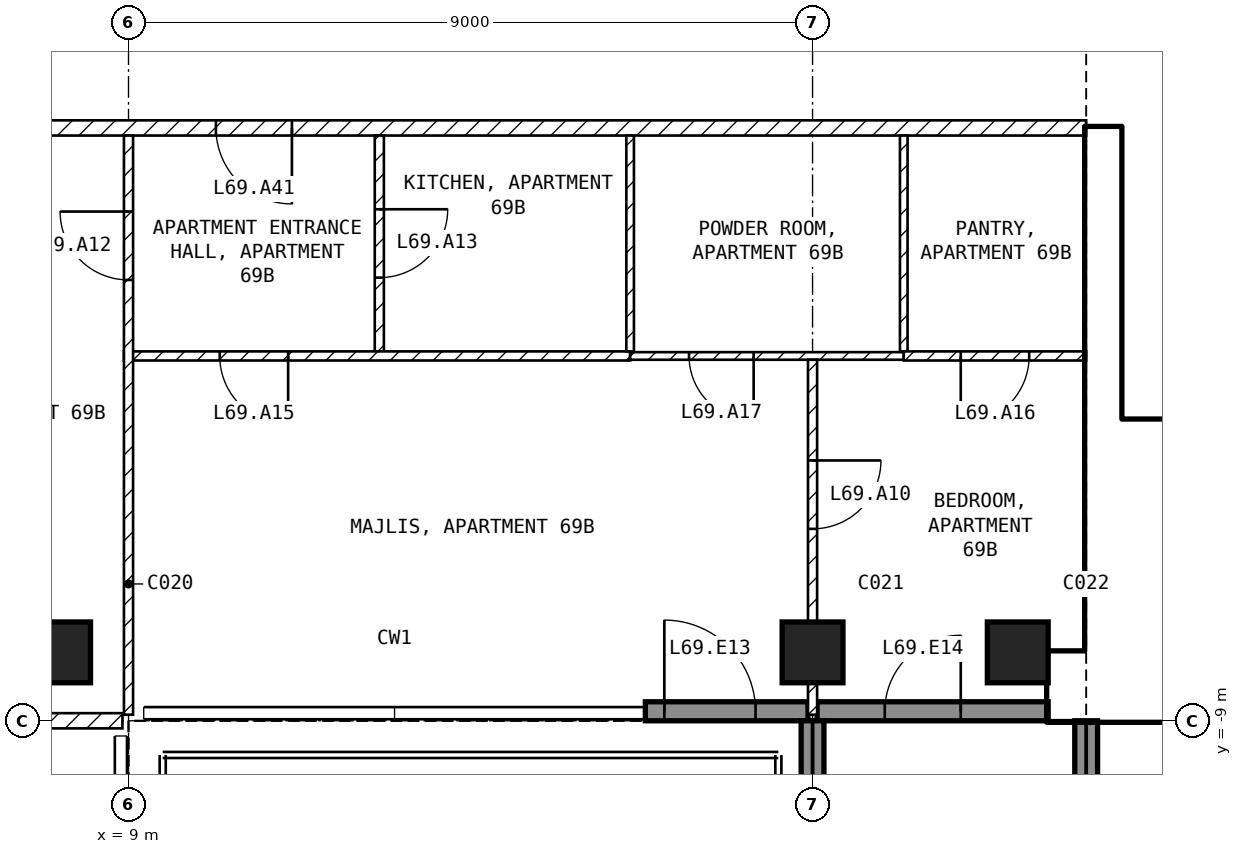
"""IFC4 building model, lengths in metres.
Left out: names, types, materials, properties, quantities, classifications, styles, units other than length and angle.
Written with IfcOpenShell. Run it as: python <this file> out.ifc"""

import sys

from ifc_helpers import new_model, si_unit, direction, frame, frame_2d, origin, origin_2d, place, context, subcontext, project, spatial, rectangle, extrude, element, fill, save


model = new_model("IFC4")
c1 = context("Model", 3, precision=1e-05, world=origin(), true_north=direction((0.0, 1.0)))
c2 = subcontext(c1, "Body", "Model", "MODEL_VIEW")
j1 = project(units=[si_unit("LENGTHUNIT", "METRE"), si_unit("PLANEANGLEUNIT", "RADIAN")], contexts=[c1])
p1 = place(None, origin())
s1 = spatial("IfcSite", under=j1, at=p1, CompositionType="ELEMENT")
p2 = place(p1, origin())
s2 = spatial("IfcBuilding", under=s1, at=p2, CompositionType="ELEMENT")
p3 = place(p2, frame((0.0, 0.0, 271.0)))
s3 = spatial("IfcBuildingStorey", under=s2, at=p3, CompositionType="ELEMENT", Elevation=271.0)
for number, where, z_axis, x_axis in (
    (1, (8.1, -8.1, -0.25), (0.0, 0.0, 1.0), (1.0, 0.0, 0.0)),
    (2, (18.0, -8.1, -0.25), (0.0, 0.0, 1.0), (1.0, 0.0, 0.0)),
    (3, (20.7, -8.1, -0.25), (0.0, 0.0, 1.0), (1.0, 0.0, 0.0)),
):
    element("IfcColumn", number, at=place(p3, frame(where, z_axis=z_axis, x_axis=x_axis)), inside=s3, PredefinedType="COLUMN", context=c2, shape_type="SweptSolid", body=[
        extrude(rectangle(XDim=0.8, YDim=0.8, at=origin_2d()), origin(), (0.0, 0.0, 1.0), 3.5),
    ])
p4 = place(p3, frame((15.8, -8.875, 0.0), z_axis=(0.0, 0.0, 1.0), x_axis=(1.0, 0.0, 0.0)))
e4 = element("IfcWall", 4, at=p4, inside=s3, PredefinedType="SOLIDWALL", context=c2, shape_type="SweptSolid", body=[
    extrude(rectangle(XDim=2.14, YDim=0.25, at=frame_2d((1.07, 0.0))), origin(), (0.0, 0.0, 1.0), 3.25),
])
p5 = place(p4, frame((0.25, 0.0, 0.0)))
e5 = element("IfcOpeningElement", 5, at=p5, cuts=e4, PredefinedType="OPENING", context=c2, shape_type="SweptSolid", body=[
    extrude(rectangle(XDim=1.2, YDim=2.4, at=frame_2d((0.6, 1.2))), frame((0.0, 0.135, 0.0), z_axis=(0.0, -1.0, 0.0), x_axis=(1.0, 0.0, 0.0)), (0.0, 0.0, 1.0), 0.27),
])
p6 = place(p3, frame((18.06, -8.875, 0.0), z_axis=(0.0, 0.0, 1.0), x_axis=(1.0, 0.0, 0.0)))
e6 = element("IfcWall", 6, at=p6, inside=s3, PredefinedType="SOLIDWALL", context=c2, shape_type="SweptSolid", body=[
    extrude(rectangle(XDim=3.04, YDim=0.25, at=frame_2d((1.52, 0.0))), origin(), (0.0, 0.0, 1.0), 3.25),
])
p7 = place(p6, frame((0.89, 0.0, 0.0)))
e7 = element("IfcOpeningElement", 7, at=p7, cuts=e6, PredefinedType="OPENING", context=c2, shape_type="SweptSolid", body=[
    extrude(rectangle(XDim=1.0, YDim=2.4, at=frame_2d((0.5, 1.2))), frame((0.0, 0.135, 0.0), z_axis=(0.0, -1.0, 0.0), x_axis=(1.0, 0.0, 0.0)), (0.0, 0.0, 1.0), 0.27),
])
p8 = place(p3, frame((18.0, -9.0, 0.0), z_axis=(0.0, 0.0, 1.0), x_axis=(0.0, -1.0, 0.0)))
e8 = element("IfcWall", 8, at=p8, inside=s3, PredefinedType="SOLIDWALL", context=c2, shape_type="SweptSolid", body=[
    extrude(rectangle(XDim=2.74, YDim=0.3, at=frame_2d((1.37, 0.0))), origin(), (0.0, 0.0, 1.0), 3.25),
])
p9 = place(p3, frame((21.6, -9.0, 0.0), z_axis=(0.0, 0.0, 1.0), x_axis=(0.0, -1.0, 0.0)))
e9 = element("IfcWall", 9, at=p9, inside=s3, PredefinedType="SOLIDWALL", context=c2, shape_type="SweptSolid", body=[
    extrude(rectangle(XDim=2.7, YDim=0.3, at=frame_2d((1.35, 0.0))), origin(), (0.0, 0.0, 1.0), 3.25),
])
p10 = place(p3, frame((21.1, -8.55, 0.0), z_axis=(0.0, 0.0, 1.0), x_axis=(1.0, 0.0, 0.0)))
e10 = element("IfcWall", 10, at=p10, inside=s3, PredefinedType="SHEAR", context=c2, shape_type="SweptSolid", body=[
    extrude(rectangle(XDim=9.1, YDim=0.9, at=frame_2d((4.55, 0.0))), origin(), (0.0, 0.0, 1.0), 3.25),
])
p11 = place(p3, frame((21.825, -8.1, 0.0), z_axis=(0.0, 0.0, 1.0), x_axis=(0.0, 1.0, 0.0)))
e11 = element("IfcWall", 11, at=p11, inside=s3, PredefinedType="SHEAR", context=c2, shape_type="SweptSolid", body=[
    extrude(rectangle(XDim=6.9, YDim=0.45, at=frame_2d((3.45, 0.0))), origin(), (0.0, 0.0, 1.0), 3.25),
])
p12 = place(p3, frame((22.05, -5.15, 0.0), z_axis=(0.0, 0.0, 1.0), x_axis=(1.0, 0.0, 0.0)))
e12 = element("IfcWall", 12, at=p12, inside=s3, PredefinedType="SOLIDWALL", context=c2, shape_type="SweptSolid", body=[
    extrude(rectangle(XDim=6.3, YDim=0.2, at=frame_2d((3.15, 0.0))), origin(), (0.0, 0.0, 1.0), 3.25),
])
p13 = place(p12, frame((0.2, 0.0, 0.0)))
e13 = element("IfcOpeningElement", 13, at=p13, cuts=e12, PredefinedType="OPENING", context=c2, shape_type="SweptSolid", body=[
    extrude(rectangle(XDim=1.0, YDim=2.1, at=frame_2d((0.5, 1.05))), frame((0.0, 0.11, 0.0), z_axis=(0.0, -1.0, 0.0), x_axis=(1.0, 0.0, 0.0)), (0.0, 0.0, 1.0), 0.22),
])
p14 = place(p3, frame((21.6, -1.2, 0.0), z_axis=(0.0, 0.0, 1.0), x_axis=(-1.0, 0.0, 0.0)))
e14 = element("IfcWall", 14, at=p14, inside=s3, PredefinedType="PARTITIONING", context=c2, shape_type="SweptSolid", body=[
    extrude(rectangle(XDim=17.2, YDim=0.2, at=frame_2d((8.6, 0.0))), origin(), (0.0, 0.0, 1.0), 3.25),
])
p15 = place(p14, frame((10.45, 0.0, 0.0)))
e15 = element("IfcOpeningElement", 15, at=p15, cuts=e14, PredefinedType="OPENING", context=c2, shape_type="SweptSolid", body=[
    extrude(rectangle(XDim=1.0, YDim=2.1, at=frame_2d((0.5, 1.05))), frame((0.0, 0.11, 0.0), z_axis=(0.0, -1.0, 0.0), x_axis=(1.0, 0.0, 0.0)), (0.0, 0.0, 1.0), 0.22),
])
p16 = place(p3, frame((8.92, -9.0, 0.0), z_axis=(0.0, 0.0, 1.0), x_axis=(-1.0, 0.0, 0.0)))
e16 = element("IfcWall", 16, at=p16, inside=s3, PredefinedType="PARTITIONING", context=c2, shape_type="SweptSolid", body=[
    extrude(rectangle(XDim=17.84, YDim=0.2, at=frame_2d((8.92, 0.0))), origin(), (0.0, 0.0, 1.0), 3.25),
])
p17 = place(p16, frame((8.42, 0.0, 0.0)))
e17 = element("IfcOpeningElement", 17, at=p17, cuts=e16, PredefinedType="OPENING", context=c2, shape_type="SweptSolid", body=[
    extrude(rectangle(XDim=1.0, YDim=2.1, at=frame_2d((0.5, 1.05))), frame((0.0, 0.11, 0.0), z_axis=(0.0, -1.0, 0.0), x_axis=(1.0, 0.0, 0.0)), (0.0, 0.0, 1.0), 0.22),
])
p18 = place(p3, frame((12.3, -1.3, 0.0), z_axis=(0.0, 0.0, 1.0), x_axis=(0.0, -1.0, 0.0)))
e18 = element("IfcWall", 18, at=p18, inside=s3, PredefinedType="PARTITIONING", context=c2, shape_type="SweptSolid", body=[
    extrude(rectangle(XDim=2.84, YDim=0.12, at=frame_2d((1.42, 0.0))), origin(), (0.0, 0.0, 1.0), 3.25),
])
p19 = place(p18, frame((0.97, 0.0, 0.0)))
e19 = element("IfcOpeningElement", 19, at=p19, cuts=e18, PredefinedType="OPENING", context=c2, shape_type="SweptSolid", body=[
    extrude(rectangle(XDim=0.9, YDim=2.1, at=frame_2d((0.45, 1.05))), frame((0.0, 0.07, 0.0), z_axis=(0.0, -1.0, 0.0), x_axis=(1.0, 0.0, 0.0)), (0.0, 0.0, 1.0), 0.14),
])
p20 = place(p3, frame((15.6, -4.2, 0.0), z_axis=(0.0, 0.0, 1.0), x_axis=(-1.0, 0.0, 0.0)))
e20 = element("IfcWall", 20, at=p20, inside=s3, PredefinedType="PARTITIONING", context=c2, shape_type="SweptSolid", body=[
    extrude(rectangle(XDim=6.66, YDim=0.12, at=frame_2d((3.33, 0.0))), origin(), (0.0, 0.0, 1.0), 3.25),
])
p21 = place(p20, frame((4.5, 0.0, 0.0)))
e21 = element("IfcOpeningElement", 21, at=p21, cuts=e20, PredefinedType="OPENING", context=c2, shape_type="SweptSolid", body=[
    extrude(rectangle(XDim=0.9, YDim=2.1, at=frame_2d((0.45, 1.05))), frame((0.0, 0.07, 0.0), z_axis=(0.0, -1.0, 0.0), x_axis=(1.0, 0.0, 0.0)), (0.0, 0.0, 1.0), 0.14),
])
p22 = place(p3, frame((9.0, -8.92, 0.0), z_axis=(0.0, 0.0, 1.0), x_axis=(0.0, 1.0, 0.0)))
e22 = element("IfcWall", 22, at=p22, inside=s3, PredefinedType="PARTITIONING", context=c2, shape_type="SweptSolid", body=[
    extrude(rectangle(XDim=7.62, YDim=0.12, at=frame_2d((3.81, 0.0))), origin(), (0.0, 0.0, 1.0), 3.25),
])
p23 = place(p22, frame((5.72, 0.0, 0.0)))
e23 = element("IfcOpeningElement", 23, at=p23, cuts=e22, PredefinedType="OPENING", context=c2, shape_type="SweptSolid", body=[
    extrude(rectangle(XDim=0.9, YDim=2.1, at=frame_2d((0.45, 1.05))), frame((0.0, 0.07, 0.0), z_axis=(0.0, -1.0, 0.0), x_axis=(1.0, 0.0, 0.0)), (0.0, 0.0, 1.0), 0.14),
])
for number, where, z_axis, x_axis in (
    (24, (15.6, -1.3, 0.0), (0.0, 0.0, 1.0), (0.0, -1.0, 0.0)),
    (25, (19.2, -1.3, 0.0), (0.0, 0.0, 1.0), (0.0, -1.0, 0.0)),
):
    element("IfcWall", number, at=place(p3, frame(where, z_axis=z_axis, x_axis=x_axis)), inside=s3, PredefinedType="PARTITIONING", context=c2, shape_type="SweptSolid", body=[
        extrude(rectangle(XDim=2.84, YDim=0.1, at=frame_2d((1.42, 0.0))), origin(), (0.0, 0.0, 1.0), 3.25),
    ])
p24 = place(p3, frame((19.2, -4.2, 0.0), z_axis=(0.0, 0.0, 1.0), x_axis=(-1.0, 0.0, 0.0)))
e26 = element("IfcWall", 26, at=p24, inside=s3, PredefinedType="PARTITIONING", context=c2, shape_type="SweptSolid", body=[
    extrude(rectangle(XDim=3.6, YDim=0.1, at=frame_2d((1.8, 0.0))), origin(), (0.0, 0.0, 1.0), 3.25),
])
p25 = place(p24, frame((1.975, 0.0, 0.0)))
e27 = element("IfcOpeningElement", 27, at=p25, cuts=e26, PredefinedType="OPENING", context=c2, shape_type="SweptSolid", body=[
    extrude(rectangle(XDim=0.85, YDim=2.1, at=frame_2d((0.425, 1.05))), frame((0.0, 0.06, 0.0), z_axis=(0.0, -1.0, 0.0), x_axis=(1.0, 0.0, 0.0)), (0.0, 0.0, 1.0), 0.12),
])
p26 = place(p3, frame((21.6, -4.2, 0.0), z_axis=(0.0, 0.0, 1.0), x_axis=(-1.0, 0.0, 0.0)))
e28 = element("IfcWall", 28, at=p26, inside=s3, PredefinedType="PARTITIONING", context=c2, shape_type="SweptSolid", body=[
    extrude(rectangle(XDim=2.4, YDim=0.12, at=frame_2d((1.2, 0.0))), origin(), (0.0, 0.0, 1.0), 3.25),
])
p27 = place(p26, frame((0.75, 0.0, 0.0)))
e29 = element("IfcOpeningElement", 29, at=p27, cuts=e28, PredefinedType="OPENING", context=c2, shape_type="SweptSolid", body=[
    extrude(rectangle(XDim=0.9, YDim=2.1, at=frame_2d((0.45, 1.05))), frame((0.0, 0.07, 0.0), z_axis=(0.0, -1.0, 0.0), x_axis=(1.0, 0.0, 0.0)), (0.0, 0.0, 1.0), 0.14),
])
p28 = place(p3, frame((18.0, -4.25, 0.0), z_axis=(0.0, 0.0, 1.0), x_axis=(0.0, -1.0, 0.0)))
e30 = element("IfcWall", 30, at=p28, inside=s3, PredefinedType="PARTITIONING", context=c2, shape_type="SweptSolid", body=[
    extrude(rectangle(XDim=4.67, YDim=0.12, at=frame_2d((2.335, 0.0))), origin(), (0.0, 0.0, 1.0), 2.496),
])
p29 = place(p28, frame((1.325, 0.0, 0.0)))
e31 = element("IfcOpeningElement", 31, at=p29, cuts=e30, PredefinedType="OPENING", context=c2, shape_type="SweptSolid", body=[
    extrude(rectangle(XDim=0.9, YDim=2.1, at=frame_2d((0.45, 1.05))), frame((0.0, 0.07, 0.0), z_axis=(0.0, -1.0, 0.0), x_axis=(1.0, 0.0, 0.0)), (0.0, 0.0, 1.0), 0.14),
])
p30 = place(p5, origin())
e32 = element("IfcDoor", 32, at=p30, inside=s3, OperationType="SINGLE_SWING_LEFT", PredefinedType="DOOR", context=c2, shape_type="SweptSolid", body=[
    extrude(rectangle(XDim=1.2, YDim=2.4, at=frame_2d((0.6, 1.2))), frame((0.0, 0.025, 0.0), z_axis=(0.0, -1.0, 0.0), x_axis=(1.0, 0.0, 0.0)), (0.0, 0.0, 1.0), 0.05),
])
fill(e5, e32)
p31 = place(p7, origin())
e33 = element("IfcDoor", 33, at=p31, inside=s3, OperationType="SINGLE_SWING_RIGHT", PredefinedType="DOOR", context=c2, shape_type="SweptSolid", body=[
    extrude(rectangle(XDim=1.0, YDim=2.4, at=frame_2d((0.5, 1.2))), frame((0.0, 0.025, 0.0), z_axis=(0.0, -1.0, 0.0), x_axis=(1.0, 0.0, 0.0)), (0.0, 0.0, 1.0), 0.05),
])
fill(e7, e33)
p32 = place(p13, origin())
e34 = element("IfcDoor", 34, at=p32, inside=s3, OperationType="SINGLE_SWING_LEFT", PredefinedType="DOOR", context=c2, shape_type="SweptSolid", body=[
    extrude(rectangle(XDim=1.0, YDim=2.1, at=frame_2d((0.5, 1.05))), frame((0.0, 0.025, 0.0), z_axis=(0.0, -1.0, 0.0), x_axis=(1.0, 0.0, 0.0)), (0.0, 0.0, 1.0), 0.05),
])
fill(e13, e34)
p33 = place(p29, origin())
e35 = element("IfcDoor", 35, at=p33, inside=s3, OperationType="SINGLE_SWING_LEFT", PredefinedType="DOOR", context=c2, shape_type="SweptSolid", body=[
    extrude(rectangle(XDim=0.9, YDim=2.1, at=frame_2d((0.45, 1.05))), frame((0.0, 0.025, 0.0), z_axis=(0.0, -1.0, 0.0), x_axis=(1.0, 0.0, 0.0)), (0.0, 0.0, 1.0), 0.05),
])
fill(e31, e35)
p34 = place(p23, origin())
e36 = element("IfcDoor", 36, at=p34, inside=s3, OperationType="SINGLE_SWING_RIGHT", PredefinedType="DOOR", context=c2, shape_type="SweptSolid", body=[
    extrude(rectangle(XDim=0.9, YDim=2.1, at=frame_2d((0.45, 1.05))), frame((0.0, 0.025, 0.0), z_axis=(0.0, -1.0, 0.0), x_axis=(1.0, 0.0, 0.0)), (0.0, 0.0, 1.0), 0.05),
])
fill(e23, e36)
p35 = place(p19, origin())
e37 = element("IfcDoor", 37, at=p35, inside=s3, OperationType="SINGLE_SWING_LEFT", PredefinedType="DOOR", context=c2, shape_type="SweptSolid", body=[
    extrude(rectangle(XDim=0.9, YDim=2.1, at=frame_2d((0.45, 1.05))), frame((0.0, 0.025, 0.0), z_axis=(0.0, -1.0, 0.0), x_axis=(1.0, 0.0, 0.0)), (0.0, 0.0, 1.0), 0.05),
])
fill(e19, e37)
p36 = place(p21, origin())
e38 = element("IfcDoor", 38, at=p36, inside=s3, OperationType="SINGLE_SWING_LEFT", PredefinedType="DOOR", context=c2, shape_type="SweptSolid", body=[
    extrude(rectangle(XDim=0.9, YDim=2.1, at=frame_2d((0.45, 1.05))), frame((0.0, 0.025, 0.0), z_axis=(0.0, -1.0, 0.0), x_axis=(1.0, 0.0, 0.0)), (0.0, 0.0, 1.0), 0.05),
])
fill(e21, e38)
p37 = place(p27, origin())
e39 = element("IfcDoor", 39, at=p37, inside=s3, OperationType="SINGLE_SWING_RIGHT", PredefinedType="DOOR", context=c2, shape_type="SweptSolid", body=[
    extrude(rectangle(XDim=0.9, YDim=2.1, at=frame_2d((0.45, 1.05))), frame((0.0, 0.025, 0.0), z_axis=(0.0, -1.0, 0.0), x_axis=(1.0, 0.0, 0.0)), (0.0, 0.0, 1.0), 0.05),
])
fill(e29, e39)
p38 = place(p25, origin())
e40 = element("IfcDoor", 40, at=p38, inside=s3, OperationType="SINGLE_SWING_LEFT", PredefinedType="DOOR", context=c2, shape_type="SweptSolid", body=[
    extrude(rectangle(XDim=0.85, YDim=2.1, at=frame_2d((0.425, 1.05))), frame((0.0, 0.025, 0.0), z_axis=(0.0, -1.0, 0.0), x_axis=(1.0, 0.0, 0.0)), (0.0, 0.0, 1.0), 0.05),
])
fill(e27, e40)
p39 = place(p15, origin())
e41 = element("IfcDoor", 41, at=p39, inside=s3, OperationType="SINGLE_SWING_LEFT", PredefinedType="DOOR", context=c2, shape_type="SweptSolid", body=[
    extrude(rectangle(XDim=1.0, YDim=2.1, at=frame_2d((0.5, 1.05))), frame((0.0, 0.025, 0.0), z_axis=(0.0, -1.0, 0.0), x_axis=(1.0, 0.0, 0.0)), (0.0, 0.0, 1.0), 0.05),
])
fill(e15, e41)
save(model, sys.argv[1])
